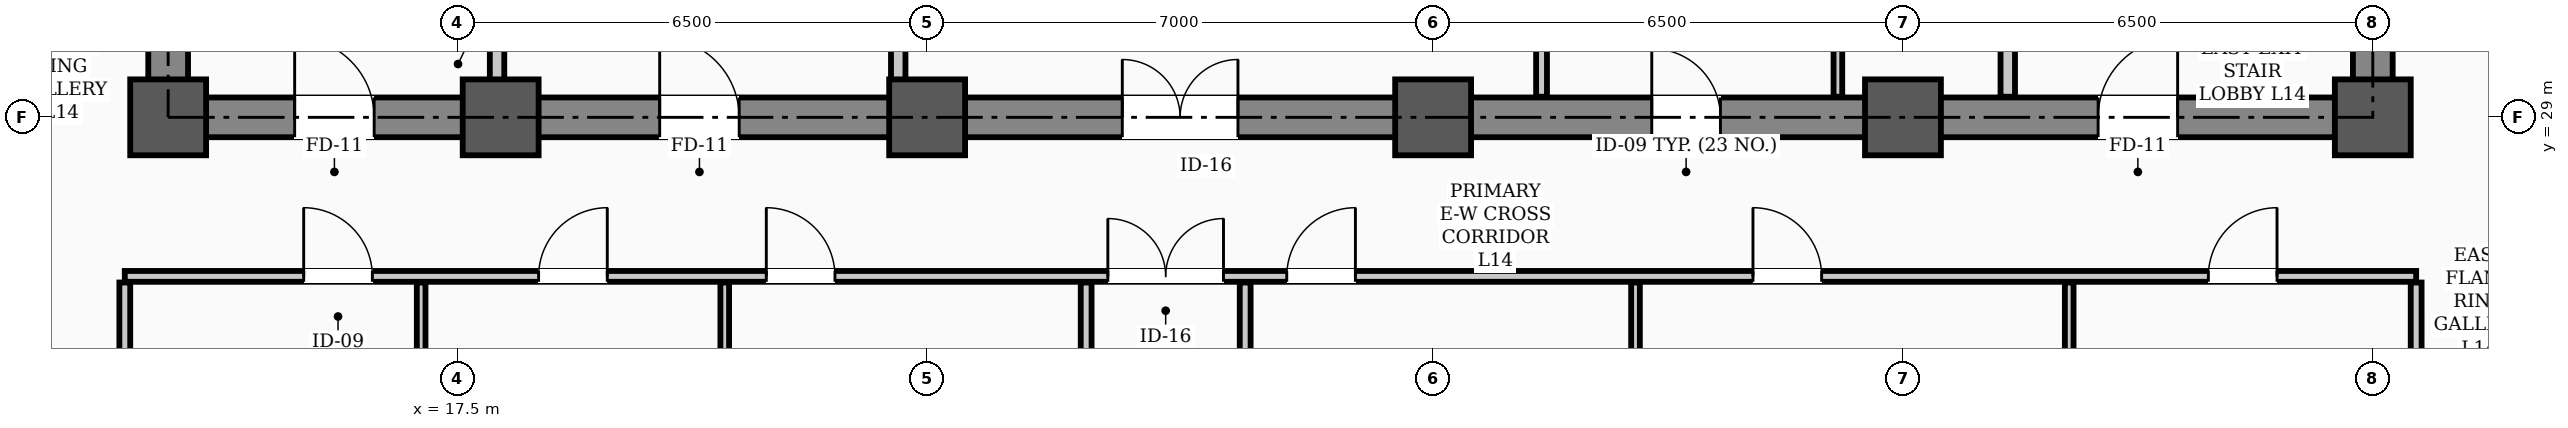
"""IFC4 building model, lengths in metres.
Left out: names, types, materials, properties, quantities, classifications, styles, units other than length and angle.
Written with IfcOpenShell. Run it as: python <this file> out.ifc"""

import sys

from ifc_helpers import new_model, si_unit, direction, frame, frame_2d, origin, origin_2d, place, context, subcontext, project, spatial, rectangle, hollow_rectangle, extrude, element, fill, save


model = new_model("IFC4")
c1 = context("Model", 3, precision=1e-05, world=origin(), true_north=direction((0.0, 1.0)))
c2 = subcontext(c1, "Body", "Model", "MODEL_VIEW")
j1 = project(units=[si_unit("LENGTHUNIT", "METRE"), si_unit("PLANEANGLEUNIT", "RADIAN")], contexts=[c1])
p1 = place(None, origin())
s1 = spatial("IfcSite", under=j1, at=p1, CompositionType="ELEMENT")
p2 = place(p1, origin())
s2 = spatial("IfcBuilding", under=s1, at=p2, CompositionType="ELEMENT")
p3 = place(p2, frame((0.0, 0.0, 57.7)))
s3 = spatial("IfcBuildingStorey", under=s2, at=p3, CompositionType="ELEMENT", Elevation=57.7)
for number, where, z_axis, x_axis in (
    (1, (13.5, 29.0, 0.0), (0.0, 0.0, 1.0), (1.0, 0.0, 0.0)),
    (2, (18.1, 29.0, 0.0), (0.0, 0.0, 1.0), (1.0, 0.0, 0.0)),
    (3, (24.0, 29.0, 0.0), (0.0, 0.0, 1.0), (1.0, 0.0, 0.0)),
    (4, (31.0, 29.0, 0.0), (0.0, 0.0, 1.0), (1.0, 0.0, 0.0)),
    (5, (37.5, 29.0, 0.0), (0.0, 0.0, 1.0), (1.0, 0.0, 0.0)),
    (6, (44.0, 29.0, 0.0), (0.0, 0.0, 1.0), (1.0, 0.0, 0.0)),
):
    element("IfcColumn", number, at=place(p3, frame(where, z_axis=z_axis, x_axis=x_axis)), inside=s3, PredefinedType="COLUMN", context=c2, shape_type="SweptSolid", body=[
        extrude(hollow_rectangle(XDim=1.05, YDim=1.05, WallThickness=0.038, InnerFilletRadius=0.019, OuterFilletRadius=0.057, at=origin_2d()), origin(), (0.0, 0.0, 1.0), 3.9),
    ])
p4 = place(p3, frame((13.5, 29.0, 0.0), z_axis=(0.0, 0.0, 1.0), x_axis=(1.0, 0.0, 0.0)))
e7 = element("IfcWall", 7, at=p4, inside=s3, PredefinedType="SHEAR", context=c2, shape_type="SweptSolid", body=[
    extrude(rectangle(XDim=30.5, YDim=0.55, at=frame_2d((15.25, 0.0))), origin(), (0.0, 0.0, 1.0), 3.72),
])
p5 = place(p4, frame((1.75, 0.0, 0.0)))
e8 = element("IfcOpeningElement", 8, at=p5, cuts=e7, PredefinedType="OPENING", context=c2, shape_type="SweptSolid", body=[
    extrude(rectangle(XDim=1.1, YDim=2.08, at=frame_2d((0.55, 1.04))), frame((0.0, 0.285, 0.0), z_axis=(0.0, -1.0, 0.0), x_axis=(1.0, 0.0, 0.0)), (0.0, 0.0, 1.0), 0.57),
])
p6 = place(p4, frame((26.7, 0.0, 0.0)))
e9 = element("IfcOpeningElement", 9, at=p6, cuts=e7, PredefinedType="OPENING", context=c2, shape_type="SweptSolid", body=[
    extrude(rectangle(XDim=1.1, YDim=2.08, at=frame_2d((0.55, 1.04))), frame((0.0, 0.285, 0.0), z_axis=(0.0, -1.0, 0.0), x_axis=(1.0, 0.0, 0.0)), (0.0, 0.0, 1.0), 0.57),
])
p7 = place(p4, frame((6.8, 0.0, 0.0)))
e10 = element("IfcOpeningElement", 10, at=p7, cuts=e7, PredefinedType="OPENING", context=c2, shape_type="SweptSolid", body=[
    extrude(rectangle(XDim=1.1, YDim=2.08, at=frame_2d((0.55, 1.04))), frame((0.0, 0.285, 0.0), z_axis=(0.0, -1.0, 0.0), x_axis=(1.0, 0.0, 0.0)), (0.0, 0.0, 1.0), 0.57),
])
p8 = place(p4, frame((13.2, 0.0, 0.0)))
e11 = element("IfcOpeningElement", 11, at=p8, cuts=e7, PredefinedType="OPENING", context=c2, shape_type="SweptSolid", body=[
    extrude(rectangle(XDim=1.6, YDim=2.08, at=frame_2d((0.8, 1.04))), frame((0.0, 0.285, 0.0), z_axis=(0.0, -1.0, 0.0), x_axis=(1.0, 0.0, 0.0)), (0.0, 0.0, 1.0), 0.57),
])
p9 = place(p4, frame((20.525, 0.0, 0.0)))
e12 = element("IfcOpeningElement", 12, at=p9, cuts=e7, PredefinedType="OPENING", context=c2, shape_type="SweptSolid", body=[
    extrude(rectangle(XDim=0.95, YDim=2.08, at=frame_2d((0.475, 1.04))), frame((0.0, 0.285, 0.0), z_axis=(0.0, -1.0, 0.0), x_axis=(1.0, 0.0, 0.0)), (0.0, 0.0, 1.0), 0.57),
])
for number, where, z_axis, x_axis in (
    (13, (13.5, 29.35, 0.0), (0.0, 0.0, 1.0), (0.0, 1.0, 0.0)),
    (14, (44.0, 29.35, 0.0), (0.0, 0.0, 1.0), (0.0, 1.0, 0.0)),
):
    element("IfcWall", number, at=place(p3, frame(where, z_axis=z_axis, x_axis=x_axis)), inside=s3, PredefinedType="SHEAR", context=c2, shape_type="SweptSolid", body=[
        extrude(rectangle(XDim=8.6, YDim=0.55, at=frame_2d((4.3, 0.0))), origin(), (0.0, 0.0, 1.0), 3.72),
    ])
p10 = place(p3, frame((12.9, 26.8, 0.0), z_axis=(0.0, 0.0, 1.0), x_axis=(1.0, 0.0, 0.0)))
e15 = element("IfcWall", 15, at=p10, inside=s3, PredefinedType="PARTITIONING", context=c2, shape_type="SweptSolid", body=[
    extrude(rectangle(XDim=31.7, YDim=0.15, at=frame_2d((15.85, 0.0))), origin(), (0.0, 0.0, 1.0), 3.1),
])
p11 = place(p10, frame((13.6, 0.0, 0.0)))
e16 = element("IfcOpeningElement", 16, at=p11, cuts=e15, PredefinedType="OPENING", context=c2, shape_type="SweptSolid", body=[
    extrude(rectangle(XDim=1.6, YDim=2.08, at=frame_2d((0.8, 1.04))), frame((0.0, 0.085, 0.0), z_axis=(0.0, -1.0, 0.0), x_axis=(1.0, 0.0, 0.0)), (0.0, 0.0, 1.0), 0.17),
])
p12 = place(p10, frame((2.475, 0.0, 0.0)))
e17 = element("IfcOpeningElement", 17, at=p12, cuts=e15, PredefinedType="OPENING", context=c2, shape_type="SweptSolid", body=[
    extrude(rectangle(XDim=0.95, YDim=2.08, at=frame_2d((0.475, 1.04))), frame((0.0, 0.085, 0.0), z_axis=(0.0, -1.0, 0.0), x_axis=(1.0, 0.0, 0.0)), (0.0, 0.0, 1.0), 0.17),
])
p13 = place(p10, frame((5.725, 0.0, 0.0)))
e18 = element("IfcOpeningElement", 18, at=p13, cuts=e15, PredefinedType="OPENING", context=c2, shape_type="SweptSolid", body=[
    extrude(rectangle(XDim=0.95, YDim=2.08, at=frame_2d((0.475, 1.04))), frame((0.0, 0.085, 0.0), z_axis=(0.0, -1.0, 0.0), x_axis=(1.0, 0.0, 0.0)), (0.0, 0.0, 1.0), 0.17),
])
p14 = place(p10, frame((8.875, 0.0, 0.0)))
e19 = element("IfcOpeningElement", 19, at=p14, cuts=e15, PredefinedType="OPENING", context=c2, shape_type="SweptSolid", body=[
    extrude(rectangle(XDim=0.95, YDim=2.08, at=frame_2d((0.475, 1.04))), frame((0.0, 0.085, 0.0), z_axis=(0.0, -1.0, 0.0), x_axis=(1.0, 0.0, 0.0)), (0.0, 0.0, 1.0), 0.17),
])
p15 = place(p10, frame((16.075, 0.0, 0.0)))
e20 = element("IfcOpeningElement", 20, at=p15, cuts=e15, PredefinedType="OPENING", context=c2, shape_type="SweptSolid", body=[
    extrude(rectangle(XDim=0.95, YDim=2.08, at=frame_2d((0.475, 1.04))), frame((0.0, 0.085, 0.0), z_axis=(0.0, -1.0, 0.0), x_axis=(1.0, 0.0, 0.0)), (0.0, 0.0, 1.0), 0.17),
])
p16 = place(p10, frame((22.525, 0.0, 0.0)))
e21 = element("IfcOpeningElement", 21, at=p16, cuts=e15, PredefinedType="OPENING", context=c2, shape_type="SweptSolid", body=[
    extrude(rectangle(XDim=0.95, YDim=2.08, at=frame_2d((0.475, 1.04))), frame((0.0, 0.085, 0.0), z_axis=(0.0, -1.0, 0.0), x_axis=(1.0, 0.0, 0.0)), (0.0, 0.0, 1.0), 0.17),
])
p17 = place(p10, frame((28.825, 0.0, 0.0)))
e22 = element("IfcOpeningElement", 22, at=p17, cuts=e15, PredefinedType="OPENING", context=c2, shape_type="SweptSolid", body=[
    extrude(rectangle(XDim=0.95, YDim=2.08, at=frame_2d((0.475, 1.04))), frame((0.0, 0.085, 0.0), z_axis=(0.0, -1.0, 0.0), x_axis=(1.0, 0.0, 0.0)), (0.0, 0.0, 1.0), 0.17),
])
for number, where, z_axis, x_axis in (
    (23, (18.05, 29.285, 0.0), (0.0, 0.0, 1.0), (0.0, 1.0, 0.0)),
    (24, (38.95, 29.285, 0.0), (0.0, 0.0, 1.0), (0.0, 1.0, 0.0)),
):
    element("IfcWall", number, at=place(p3, frame(where, z_axis=z_axis, x_axis=x_axis)), inside=s3, PredefinedType="STANDARD", context=c2, shape_type="SweptSolid", body=[
        extrude(rectangle(XDim=1.015, YDim=0.2, at=frame_2d((0.508, 0.0))), origin(), (0.0, 0.0, 1.0), 3.3),
    ])
p18 = place(p3, frame((23.6, 29.285, 0.0), z_axis=(0.0, 0.0, 1.0), x_axis=(0.0, 1.0, 0.0)))
e25 = element("IfcWall", 25, at=p18, inside=s3, PredefinedType="STANDARD", context=c2, shape_type="SweptSolid", body=[
    extrude(rectangle(XDim=5.415, YDim=0.2, at=frame_2d((2.708, 0.0))), origin(), (0.0, 0.0, 1.0), 3.1),
])
p19 = place(p3, frame((32.5, 29.285, 0.0), z_axis=(0.0, 0.0, 1.0), x_axis=(0.0, 1.0, 0.0)))
e26 = element("IfcWall", 26, at=p19, inside=s3, PredefinedType="PARTITIONING", context=c2, shape_type="SweptSolid", body=[
    extrude(rectangle(XDim=2.48, YDim=0.15, at=frame_2d((1.24, 0.0))), origin(), (0.0, 0.0, 1.0), 3.3),
])
p20 = place(p3, frame((36.6, 29.285, 0.0), z_axis=(0.0, 0.0, 1.0), x_axis=(0.0, 1.0, 0.0)))
e27 = element("IfcWall", 27, at=p20, inside=s3, PredefinedType="PARTITIONING", context=c2, shape_type="SweptSolid", body=[
    extrude(rectangle(XDim=2.48, YDim=0.12, at=frame_2d((1.24, 0.0))), origin(), (0.0, 0.0, 1.0), 3.3),
])
for number, where, z_axis, x_axis in (
    (28, (26.2, 19.335, 0.0), (0.0, 0.0, 1.0), (0.0, 1.0, 0.0)),
    (29, (28.4, 19.335, 0.0), (0.0, 0.0, 1.0), (0.0, 1.0, 0.0)),
    (30, (12.9, 19.335, 0.0), (0.0, 0.0, 1.0), (0.0, 1.0, 0.0)),
    (31, (44.6, 19.335, 0.0), (0.0, 0.0, 1.0), (0.0, 1.0, 0.0)),
):
    element("IfcWall", number, at=place(p3, frame(where, z_axis=z_axis, x_axis=x_axis)), inside=s3, PredefinedType="PARTITIONING", context=c2, shape_type="SweptSolid", body=[
        extrude(rectangle(XDim=7.38, YDim=0.15, at=frame_2d((3.69, 0.0))), origin(), (0.0, 0.0, 1.0), 3.0),
    ])
for number, where, z_axis, x_axis in (
    (32, (17.0, 19.335, 0.0), (0.0, 0.0, 1.0), (0.0, 1.0, 0.0)),
    (33, (21.2, 19.335, 0.0), (0.0, 0.0, 1.0), (0.0, 1.0, 0.0)),
    (34, (33.8, 19.335, 0.0), (0.0, 0.0, 1.0), (0.0, 1.0, 0.0)),
    (35, (39.8, 19.335, 0.0), (0.0, 0.0, 1.0), (0.0, 1.0, 0.0)),
):
    element("IfcWall", number, at=place(p3, frame(where, z_axis=z_axis, x_axis=x_axis)), inside=s3, PredefinedType="PARTITIONING", context=c2, shape_type="SweptSolid", body=[
        extrude(rectangle(XDim=7.38, YDim=0.12, at=frame_2d((3.69, 0.0))), origin(), (0.0, 0.0, 1.0), 3.0),
    ])
p21 = place(p5, origin())
e36 = element("IfcDoor", 36, at=p21, inside=s3, OperationType="SINGLE_SWING_LEFT", PredefinedType="DOOR", context=c2, shape_type="SweptSolid", body=[
    extrude(rectangle(XDim=1.1, YDim=2.08, at=frame_2d((0.55, 1.04))), frame((0.0, 0.025, 0.0), z_axis=(0.0, -1.0, 0.0), x_axis=(1.0, 0.0, 0.0)), (0.0, 0.0, 1.0), 0.05),
])
fill(e8, e36)
p22 = place(p6, origin())
e37 = element("IfcDoor", 37, at=p22, inside=s3, OperationType="SINGLE_SWING_RIGHT", PredefinedType="DOOR", context=c2, shape_type="SweptSolid", body=[
    extrude(rectangle(XDim=1.1, YDim=2.08, at=frame_2d((0.55, 1.04))), frame((0.0, 0.025, 0.0), z_axis=(0.0, -1.0, 0.0), x_axis=(1.0, 0.0, 0.0)), (0.0, 0.0, 1.0), 0.05),
])
fill(e9, e37)
p23 = place(p7, origin())
e38 = element("IfcDoor", 38, at=p23, inside=s3, OperationType="SINGLE_SWING_LEFT", PredefinedType="DOOR", context=c2, shape_type="SweptSolid", body=[
    extrude(rectangle(XDim=1.1, YDim=2.08, at=frame_2d((0.55, 1.04))), frame((0.0, 0.025, 0.0), z_axis=(0.0, -1.0, 0.0), x_axis=(1.0, 0.0, 0.0)), (0.0, 0.0, 1.0), 0.05),
])
fill(e10, e38)
p24 = place(p8, origin())
e39 = element("IfcDoor", 39, at=p24, inside=s3, OperationType="DOUBLE_DOOR_SINGLE_SWING", PredefinedType="DOOR", context=c2, shape_type="SweptSolid", body=[
    extrude(rectangle(XDim=1.6, YDim=2.08, at=frame_2d((0.8, 1.04))), frame((0.0, 0.025, 0.0), z_axis=(0.0, -1.0, 0.0), x_axis=(1.0, 0.0, 0.0)), (0.0, 0.0, 1.0), 0.05),
])
fill(e11, e39)
p25 = place(p9, origin())
e40 = element("IfcDoor", 40, at=p25, inside=s3, OperationType="SINGLE_SWING_LEFT", PredefinedType="DOOR", context=c2, shape_type="SweptSolid", body=[
    extrude(rectangle(XDim=0.95, YDim=2.08, at=frame_2d((0.475, 1.04))), frame((0.0, 0.025, 0.0), z_axis=(0.0, -1.0, 0.0), x_axis=(1.0, 0.0, 0.0)), (0.0, 0.0, 1.0), 0.05),
])
fill(e12, e40)
p26 = place(p11, origin())
e41 = element("IfcDoor", 41, at=p26, inside=s3, OperationType="DOUBLE_DOOR_SINGLE_SWING", PredefinedType="DOOR", context=c2, shape_type="SweptSolid", body=[
    extrude(rectangle(XDim=1.6, YDim=2.08, at=frame_2d((0.8, 1.04))), frame((0.0, 0.025, 0.0), z_axis=(0.0, -1.0, 0.0), x_axis=(1.0, 0.0, 0.0)), (0.0, 0.0, 1.0), 0.05),
])
fill(e16, e41)
p27 = place(p12, origin())
e42 = element("IfcDoor", 42, at=p27, inside=s3, OperationType="SINGLE_SWING_LEFT", PredefinedType="DOOR", context=c2, shape_type="SweptSolid", body=[
    extrude(rectangle(XDim=0.95, YDim=2.08, at=frame_2d((0.475, 1.04))), frame((0.0, 0.025, 0.0), z_axis=(0.0, -1.0, 0.0), x_axis=(1.0, 0.0, 0.0)), (0.0, 0.0, 1.0), 0.05),
])
fill(e17, e42)
p28 = place(p13, origin())
e43 = element("IfcDoor", 43, at=p28, inside=s3, OperationType="SINGLE_SWING_RIGHT", PredefinedType="DOOR", context=c2, shape_type="SweptSolid", body=[
    extrude(rectangle(XDim=0.95, YDim=2.08, at=frame_2d((0.475, 1.04))), frame((0.0, 0.025, 0.0), z_axis=(0.0, -1.0, 0.0), x_axis=(1.0, 0.0, 0.0)), (0.0, 0.0, 1.0), 0.05),
])
fill(e18, e43)
p29 = place(p14, origin())
e44 = element("IfcDoor", 44, at=p29, inside=s3, OperationType="SINGLE_SWING_LEFT", PredefinedType="DOOR", context=c2, shape_type="SweptSolid", body=[
    extrude(rectangle(XDim=0.95, YDim=2.08, at=frame_2d((0.475, 1.04))), frame((0.0, 0.025, 0.0), z_axis=(0.0, -1.0, 0.0), x_axis=(1.0, 0.0, 0.0)), (0.0, 0.0, 1.0), 0.05),
])
fill(e19, e44)
p30 = place(p15, origin())
e45 = element("IfcDoor", 45, at=p30, inside=s3, OperationType="SINGLE_SWING_RIGHT", PredefinedType="DOOR", context=c2, shape_type="SweptSolid", body=[
    extrude(rectangle(XDim=0.95, YDim=2.08, at=frame_2d((0.475, 1.04))), frame((0.0, 0.025, 0.0), z_axis=(0.0, -1.0, 0.0), x_axis=(1.0, 0.0, 0.0)), (0.0, 0.0, 1.0), 0.05),
])
fill(e20, e45)
p31 = place(p16, origin())
e46 = element("IfcDoor", 46, at=p31, inside=s3, OperationType="SINGLE_SWING_LEFT", PredefinedType="DOOR", context=c2, shape_type="SweptSolid", body=[
    extrude(rectangle(XDim=0.95, YDim=2.08, at=frame_2d((0.475, 1.04))), frame((0.0, 0.025, 0.0), z_axis=(0.0, -1.0, 0.0), x_axis=(1.0, 0.0, 0.0)), (0.0, 0.0, 1.0), 0.05),
])
fill(e21, e46)
p32 = place(p17, origin())
e47 = element("IfcDoor", 47, at=p32, inside=s3, OperationType="SINGLE_SWING_RIGHT", PredefinedType="DOOR", context=c2, shape_type="SweptSolid", body=[
    extrude(rectangle(XDim=0.95, YDim=2.08, at=frame_2d((0.475, 1.04))), frame((0.0, 0.025, 0.0), z_axis=(0.0, -1.0, 0.0), x_axis=(1.0, 0.0, 0.0)), (0.0, 0.0, 1.0), 0.05),
])
fill(e22, e47)
save(model, sys.argv[1])
